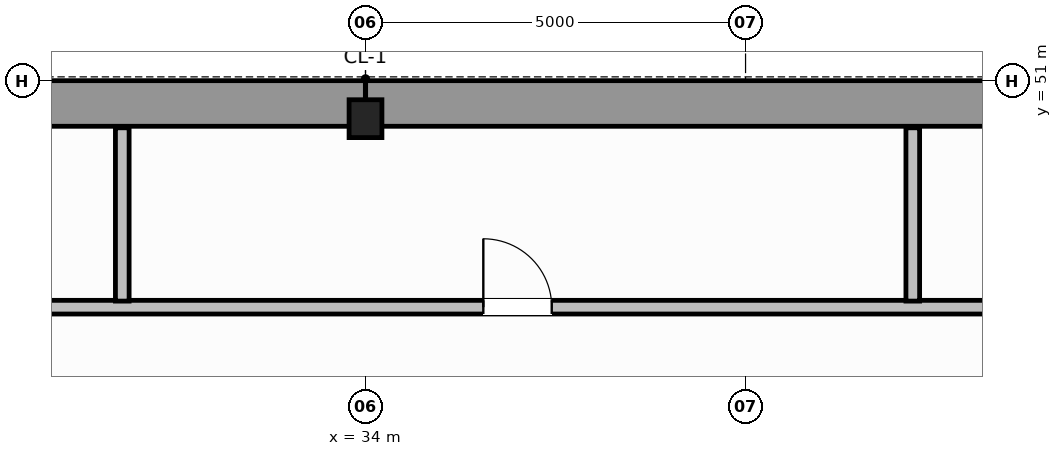
"""IFC4 building model, lengths in metres.
Left out: names, types, materials, properties, quantities, classifications, styles, units other than length and angle.
Written with IfcOpenShell. Run it as: python <this file> out.ifc"""

import sys

from ifc_helpers import new_model, si_unit, direction, frame, frame_2d, origin, origin_2d, place, context, subcontext, project, spatial, rectangle, i_section, extrude, source, transform, mapped, element, fill, save


model = new_model("IFC4")
c1 = context("Model", 3, precision=1e-05, world=origin(), true_north=direction((0.0, 1.0)))
c2 = subcontext(c1, "Body", "Model", "MODEL_VIEW")
j1 = project(units=[si_unit("LENGTHUNIT", "METRE"), si_unit("PLANEANGLEUNIT", "RADIAN")], contexts=[c1])
p1 = place(None, origin())
s1 = spatial("IfcSite", under=j1, at=p1, CompositionType="ELEMENT")
p2 = place(p1, origin())
s2 = spatial("IfcBuilding", under=s1, at=p2, CompositionType="ELEMENT")
p3 = place(p2, frame((0.0, 0.0, 176.6)))
s3 = spatial("IfcBuildingStorey", under=s2, at=p3, CompositionType="ELEMENT", Elevation=176.6)
m1 = source(origin(), c2, "Body", "SweptSolid", [
    extrude(i_section(OverallWidth=0.432, OverallDepth=0.498, WebThickness=0.055, FlangeThickness=0.068, FilletRadius=0.015, at=origin_2d()), origin(), (0.0, 0.0, 1.0), 3.8),
])
p4 = place(p3, frame((34.0, 50.5, 0.0), z_axis=(0.0, 0.0, 1.0), x_axis=(1.0, 0.0, 0.0)))
e1 = element("IfcColumn", 1, at=p4, inside=s3, PredefinedType="COLUMN", context=c2, shape_type="MappedRepresentation", body=[
    mapped(m1, transform((0.0, 0.0, 0.0), scale=1.0)),
])
for number, where, z_axis, x_axis in (
    (2, (14.304, 50.7, 0.0), (0.0, 0.0, 1.0), (1.0, 0.0, 0.0)),
    (3, (34.002, 50.7, 0.0), (0.0, 0.0, 1.0), (1.0, 0.0, 0.0)),
):
    element("IfcWall", number, at=place(p3, frame(where, z_axis=z_axis, x_axis=x_axis)), inside=s3, PredefinedType="SHEAR", context=c2, shape_type="SweptSolid", body=[
        extrude(rectangle(XDim=19.694, YDim=0.6, at=frame_2d((9.847, 0.0))), origin(), (0.0, 0.0, 1.0), 3.8),
    ])
p5 = place(p3, frame((18.62, 48.02, 0.0), z_axis=(0.0, 0.0, 1.0), x_axis=(1.0, 0.0, 0.0)))
e4 = element("IfcWall", 4, at=p5, inside=s3, PredefinedType="PLUMBINGWALL", context=c2, shape_type="SweptSolid", body=[
    extrude(rectangle(XDim=30.76, YDim=0.18, at=frame_2d((15.38, 0.0))), origin(), (0.0, 0.0, 1.0), 3.58),
])
p6 = place(p5, frame((1.955, 0.0, 0.0)))
e5 = element("IfcOpeningElement", 5, at=p6, cuts=e4, PredefinedType="OPENING", context=c2, shape_type="SweptSolid", body=[
    extrude(rectangle(XDim=0.9, YDim=2.15, at=frame_2d((0.45, 1.075))), frame((0.0, 0.1, 0.0), z_axis=(0.0, -1.0, 0.0), x_axis=(1.0, 0.0, 0.0)), (0.0, 0.0, 1.0), 0.2),
])
p7 = place(p5, frame((8.03, 0.0, 0.0)))
e6 = element("IfcOpeningElement", 6, at=p7, cuts=e4, PredefinedType="OPENING", context=c2, shape_type="SweptSolid", body=[
    extrude(rectangle(XDim=0.9, YDim=2.15, at=frame_2d((0.45, 1.075))), frame((0.0, 0.1, 0.0), z_axis=(0.0, -1.0, 0.0), x_axis=(1.0, 0.0, 0.0)), (0.0, 0.0, 1.0), 0.2),
])
p8 = place(p5, frame((16.93, 0.0, 0.0)))
e7 = element("IfcOpeningElement", 7, at=p8, cuts=e4, PredefinedType="OPENING", context=c2, shape_type="SweptSolid", body=[
    extrude(rectangle(XDim=0.9, YDim=2.15, at=frame_2d((0.45, 1.075))), frame((0.0, 0.1, 0.0), z_axis=(0.0, -1.0, 0.0), x_axis=(1.0, 0.0, 0.0)), (0.0, 0.0, 1.0), 0.2),
])
p9 = place(p5, frame((26.205, 0.0, 0.0)))
e8 = element("IfcOpeningElement", 8, at=p9, cuts=e4, PredefinedType="OPENING", context=c2, shape_type="SweptSolid", body=[
    extrude(rectangle(XDim=0.9, YDim=2.15, at=frame_2d((0.45, 1.075))), frame((0.0, 0.1, 0.0), z_axis=(0.0, -1.0, 0.0), x_axis=(1.0, 0.0, 0.0)), (0.0, 0.0, 1.0), 0.2),
])
for number, where, z_axis, x_axis in (
    (9, (30.8, 48.1, 0.0), (0.0, 0.0, 1.0), (0.0, 1.0, 0.0)),
    (10, (41.2, 48.1, 0.0), (0.0, 0.0, 1.0), (0.0, 1.0, 0.0)),
):
    element("IfcWall", number, at=place(p3, frame(where, z_axis=z_axis, x_axis=x_axis)), inside=s3, PredefinedType="PLUMBINGWALL", context=c2, shape_type="SweptSolid", body=[
        extrude(rectangle(XDim=2.28, YDim=0.18, at=frame_2d((1.14, 0.0))), origin(), (0.0, 0.0, 1.0), 3.58),
    ])
m2 = source(origin(), c2, "Body", "SweptSolid", [
    extrude(rectangle(XDim=0.9, YDim=2.15, at=frame_2d((0.45, 1.075))), frame((0.0, 0.025, 0.0), z_axis=(0.0, -1.0, 0.0), x_axis=(1.0, 0.0, 0.0)), (0.0, 0.0, 1.0), 0.05),
])
p10 = place(p8, origin())
e11 = element("IfcDoor", 11, at=p10, inside=s3, OperationType="SINGLE_SWING_LEFT", PredefinedType="DOOR", context=c2, shape_type="MappedRepresentation", body=[
    mapped(m2, transform((0.0, 0.0, 0.0), scale=1.0)),
])
fill(e7, e11)
save(model, sys.argv[1])
